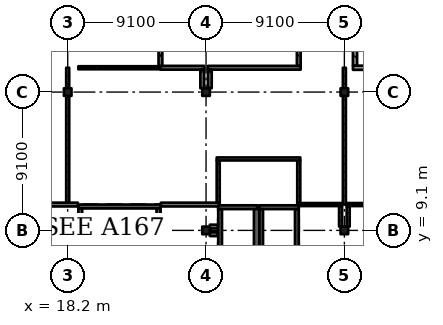
"""IFC4 building model, lengths in metres.
Left out: names, types, materials, properties, quantities, classifications, styles, units other than length and angle.
Written with IfcOpenShell. Run it as: python <this file> out.ifc"""

import sys

from ifc_helpers import new_model, si_unit, direction, frame, frame_2d, origin, origin_2d, place, context, subcontext, project, spatial, rectangle, extrude, element, fill, save


model = new_model("IFC4")
c1 = context("Model", 3, precision=1e-05, world=origin(), true_north=direction((0.0, 1.0)))
c2 = subcontext(c1, "Body", "Model", "MODEL_VIEW")
j1 = project(units=[si_unit("LENGTHUNIT", "METRE"), si_unit("PLANEANGLEUNIT", "RADIAN")], contexts=[c1])
p1 = place(None, origin())
s1 = spatial("IfcSite", under=j1, at=p1, CompositionType="ELEMENT")
p2 = place(p1, origin())
s2 = spatial("IfcBuilding", under=s1, at=p2, CompositionType="ELEMENT")
p3 = place(p2, frame((0.0, 0.0, 24.57)))
s3 = spatial("IfcBuildingStorey", under=s2, at=p3, CompositionType="ELEMENT", Elevation=24.57)
for number, where, z_axis, x_axis in (
    (1, (18.2, 9.1, 0.0), (0.0, 0.0, 1.0), (1.0, 0.0, 0.0)),
    (2, (18.2, 18.2, 0.0), (0.0, 0.0, 1.0), (1.0, 0.0, 0.0)),
    (3, (27.3, 9.1, 0.0), (0.0, 0.0, 1.0), (1.0, 0.0, 0.0)),
    (4, (27.3, 18.2, 0.0), (0.0, 0.0, 1.0), (1.0, 0.0, 0.0)),
    (5, (36.4, 9.1, 0.0), (0.0, 0.0, 1.0), (1.0, 0.0, 0.0)),
    (6, (36.4, 18.2, 0.0), (0.0, 0.0, 1.0), (1.0, 0.0, 0.0)),
):
    element("IfcColumn", number, at=place(p3, frame(where, z_axis=z_axis, x_axis=x_axis)), inside=s3, PredefinedType="COLUMN", context=c2, shape_type="SweptSolid", body=[
        extrude(rectangle(XDim=0.5, YDim=0.5, at=origin_2d()), origin(), (0.0, 0.0, 1.0), 4.55),
    ])
p4 = place(p3, frame((30.7, 10.625, 0.0), z_axis=(0.0, 0.0, 1.0), x_axis=(-1.0, 0.0, 0.0)))
e7 = element("IfcWall", 7, at=p4, inside=s3, PredefinedType="SHEAR", context=c2, shape_type="SweptSolid", body=[
    extrude(rectangle(XDim=2.6, YDim=0.25, at=frame_2d((1.3, 0.0))), origin(), (0.0, 0.0, 1.0), 4.55),
])
p5 = place(p4, frame((0.8, 0.0, 0.0)))
e8 = element("IfcOpeningElement", 8, at=p5, cuts=e7, PredefinedType="OPENING", context=c2, shape_type="SweptSolid", body=[
    extrude(rectangle(XDim=1.0, YDim=2.1, at=frame_2d((0.5, 1.05))), frame((0.0, 0.135, 0.0), z_axis=(0.0, -1.0, 0.0), x_axis=(1.0, 0.0, 0.0)), (0.0, 0.0, 1.0), 0.27),
])
p6 = place(p3, frame((28.225, 10.5, 0.0), z_axis=(0.0, 0.0, 1.0), x_axis=(0.0, -1.0, 0.0)))
e9 = element("IfcWall", 9, at=p6, inside=s3, PredefinedType="SHEAR", context=c2, shape_type="SweptSolid", body=[
    extrude(rectangle(XDim=2.9, YDim=0.25, at=frame_2d((1.45, 0.0))), origin(), (0.0, 0.0, 1.0), 4.55),
])
p7 = place(p3, frame((30.625, 10.5, 0.0), z_axis=(0.0, 0.0, 1.0), x_axis=(0.0, -1.0, 0.0)))
e10 = element("IfcWall", 10, at=p7, inside=s3, PredefinedType="SHEAR", context=c2, shape_type="SweptSolid", body=[
    extrude(rectangle(XDim=2.9, YDim=0.35, at=frame_2d((1.45, 0.0))), origin(), (0.0, 0.0, 1.0), 4.55),
])
p8 = place(p3, frame((33.4, 10.625, 0.0), z_axis=(0.0, 0.0, 1.0), x_axis=(-1.0, 0.0, 0.0)))
e11 = element("IfcWall", 11, at=p8, inside=s3, PredefinedType="SHEAR", context=c2, shape_type="SweptSolid", body=[
    extrude(rectangle(XDim=2.6, YDim=0.25, at=frame_2d((1.3, 0.0))), origin(), (0.0, 0.0, 1.0), 4.55),
])
p9 = place(p8, frame((0.8, 0.0, 0.0)))
e12 = element("IfcOpeningElement", 12, at=p9, cuts=e11, PredefinedType="OPENING", context=c2, shape_type="SweptSolid", body=[
    extrude(rectangle(XDim=1.0, YDim=2.1, at=frame_2d((0.5, 1.05))), frame((0.0, 0.135, 0.0), z_axis=(0.0, -1.0, 0.0), x_axis=(1.0, 0.0, 0.0)), (0.0, 0.0, 1.0), 0.27),
])
for number, where, z_axis, x_axis in (
    (13, (30.925, 10.5, 0.0), (0.0, 0.0, 1.0), (0.0, -1.0, 0.0)),
    (14, (33.275, 10.5, 0.0), (0.0, 0.0, 1.0), (0.0, -1.0, 0.0)),
):
    element("IfcWall", number, at=place(p3, frame(where, z_axis=z_axis, x_axis=x_axis)), inside=s3, PredefinedType="SHEAR", context=c2, shape_type="SweptSolid", body=[
        extrude(rectangle(XDim=2.9, YDim=0.25, at=frame_2d((1.45, 0.0))), origin(), (0.0, 0.0, 1.0), 4.55),
    ])
p10 = place(p3, frame((24.3, 10.675, 0.0), z_axis=(0.0, 0.0, 1.0), x_axis=(-1.0, 0.0, 0.0)))
e15 = element("IfcWall", 15, at=p10, inside=s3, PredefinedType="SHEAR", context=c2, shape_type="SweptSolid", body=[
    extrude(rectangle(XDim=5.4, YDim=0.25, at=frame_2d((2.7, 0.0))), origin(), (0.0, 0.0, 1.0), 4.55),
])
p11 = place(p10, frame((1.5, 0.0, 0.0)))
e16 = element("IfcOpeningElement", 16, at=p11, cuts=e15, PredefinedType="OPENING", context=c2, shape_type="SweptSolid", body=[
    extrude(rectangle(XDim=2.4, YDim=2.1, at=frame_2d((1.2, 1.05))), frame((0.0, 0.135, 0.0), z_axis=(0.0, -1.0, 0.0), x_axis=(1.0, 0.0, 0.0)), (0.0, 0.0, 1.0), 0.27),
])
for number, where, z_axis, x_axis in (
    (17, (19.025, 10.55, 0.0), (0.0, 0.0, 1.0), (0.0, -1.0, 0.0)),
    (18, (24.175, 10.55, 0.0), (0.0, 0.0, 1.0), (0.0, -1.0, 0.0)),
):
    element("IfcWall", number, at=place(p3, frame(where, z_axis=z_axis, x_axis=x_axis)), inside=s3, PredefinedType="SHEAR", context=c2, shape_type="SweptSolid", body=[
        extrude(rectangle(XDim=9.6, YDim=0.25, at=frame_2d((4.8, 0.0))), origin(), (0.0, 0.0, 1.0), 4.55),
    ])
p12 = place(p3, frame((15.23, 10.8, 0.0), z_axis=(0.0, 0.0, 1.0), x_axis=(1.0, 0.0, 0.0)))
e19 = element("IfcWall", 19, at=p12, inside=s3, PredefinedType="SOLIDWALL", context=c2, shape_type="SweptSolid", body=[
    extrude(rectangle(XDim=3.64, YDim=0.25, at=frame_2d((1.82, 0.0))), origin(), (0.0, 0.0, 1.0), 4.35),
])
p13 = place(p12, frame((1.12, 0.0, 0.0)))
e20 = element("IfcOpeningElement", 20, at=p13, cuts=e19, PredefinedType="OPENING", context=c2, shape_type="SweptSolid", body=[
    extrude(rectangle(XDim=0.8, YDim=2.1, at=frame_2d((0.4, 1.05))), frame((0.0, 0.135, 0.0), z_axis=(0.0, -1.0, 0.0), x_axis=(1.0, 0.0, 0.0)), (0.0, 0.0, 1.0), 0.27),
])
p14 = place(p3, frame((18.2, 17.95, 0.0), z_axis=(0.0, 0.0, 1.0), x_axis=(0.0, -1.0, 0.0)))
e21 = element("IfcWall", 21, at=p14, inside=s3, PredefinedType="PARTITIONING", context=c2, shape_type="SweptSolid", body=[
    extrude(rectangle(XDim=7.025, YDim=0.2, at=frame_2d((3.512, 0.0))), origin(), (0.0, 0.0, 1.0), 3.6),
])
p15 = place(p14, frame((0.85, 0.0, 0.0)))
e22 = element("IfcOpeningElement", 22, at=p15, cuts=e21, PredefinedType="OPENING", context=c2, shape_type="SweptSolid", body=[
    extrude(rectangle(XDim=1.8, YDim=2.4, at=frame_2d((0.9, 1.2))), frame((0.0, 0.11, 0.0), z_axis=(0.0, -1.0, 0.0), x_axis=(1.0, 0.0, 0.0)), (0.0, 0.0, 1.0), 0.22),
])
p16 = place(p14, frame((4.35, 0.0, 0.0)))
e23 = element("IfcOpeningElement", 23, at=p16, cuts=e21, PredefinedType="OPENING", context=c2, shape_type="SweptSolid", body=[
    extrude(rectangle(XDim=1.8, YDim=2.4, at=frame_2d((0.9, 1.2))), frame((0.0, 0.11, 0.0), z_axis=(0.0, -1.0, 0.0), x_axis=(1.0, 0.0, 0.0)), (0.0, 0.0, 1.0), 0.22),
])
p17 = place(p3, frame((18.2, 19.8, 0.0), z_axis=(0.0, 0.0, 1.0), x_axis=(0.0, -1.0, 0.0)))
e24 = element("IfcWall", 24, at=p17, inside=s3, PredefinedType="PARTITIONING", context=c2, shape_type="SweptSolid", body=[
    extrude(rectangle(XDim=1.35, YDim=0.2, at=frame_2d((0.675, 0.0))), origin(), (0.0, 0.0, 1.0), 3.6),
])
for number, where, z_axis, x_axis in (
    (25, (18.45, 8.85, 0.0), (0.0, 0.0, 1.0), (1.0, 0.0, 0.0)),
    (26, (18.87, 9.35, 0.0), (0.0, 0.0, 1.0), (-1.0, 0.0, 0.0)),
):
    element("IfcWall", number, at=place(p3, frame(where, z_axis=z_axis, x_axis=x_axis)), inside=s3, PredefinedType="SOLIDWALL", context=c2, shape_type="SweptSolid", body=[
        extrude(rectangle(XDim=0.42, YDim=0.25, at=frame_2d((0.21, 0.0))), origin(), (0.0, 0.0, 1.0), 4.35),
    ])
p18 = place(p3, frame((18.9, 19.8, 0.0), z_axis=(0.0, 0.0, 1.0), x_axis=(1.0, 0.0, 0.0)))
e27 = element("IfcWall", 27, at=p18, inside=s3, PredefinedType="PARTITIONING", context=c2, shape_type="SweptSolid", body=[
    extrude(rectangle(XDim=5.4, YDim=0.2, at=frame_2d((2.7, 0.0))), origin(), (0.0, 0.0, 1.0), 4.35),
])
p19 = place(p18, frame((1.85, 0.0, 0.0)))
e28 = element("IfcOpeningElement", 28, at=p19, cuts=e27, PredefinedType="OPENING", context=c2, shape_type="SweptSolid", body=[
    extrude(rectangle(XDim=1.8, YDim=2.4, at=frame_2d((0.9, 1.2))), frame((0.0, 0.11, 0.0), z_axis=(0.0, -1.0, 0.0), x_axis=(1.0, 0.0, 0.0)), (0.0, 0.0, 1.0), 0.22),
])
p20 = place(p3, frame((24.3, 19.8, 0.0), z_axis=(0.0, 0.0, 1.0), x_axis=(1.0, 0.0, 0.0)))
e29 = element("IfcWall", 29, at=p20, inside=s3, PredefinedType="SOLIDWALL", context=c2, shape_type="SweptSolid", body=[
    extrude(rectangle(XDim=2.875, YDim=0.25, at=frame_2d((1.438, 0.0))), origin(), (0.0, 0.0, 1.0), 4.35),
])
p21 = place(p3, frame((24.3, 19.925, 0.0), z_axis=(0.0, 0.0, 1.0), x_axis=(0.0, 1.0, 0.0)))
e30 = element("IfcWall", 30, at=p21, inside=s3, PredefinedType="SOLIDWALL", context=c2, shape_type="SweptSolid", body=[
    extrude(rectangle(XDim=6.945, YDim=0.25, at=frame_2d((3.473, 0.0))), origin(), (0.0, 0.0, 1.0), 4.35),
])
p22 = place(p3, frame((27.05, 19.675, 0.0), z_axis=(0.0, 0.0, 1.0), x_axis=(0.0, -1.0, 0.0)))
e31 = element("IfcWall", 31, at=p22, inside=s3, PredefinedType="SOLIDWALL", context=c2, shape_type="SweptSolid", body=[
    extrude(rectangle(XDim=1.225, YDim=0.25, at=frame_2d((0.613, 0.0))), origin(), (0.0, 0.0, 1.0), 4.35),
])
p23 = place(p3, frame((27.425, 19.8, 0.0), z_axis=(0.0, 0.0, 1.0), x_axis=(1.0, 0.0, 0.0)))
e32 = element("IfcWall", 32, at=p23, inside=s3, PredefinedType="SOLIDWALL", context=c2, shape_type="SweptSolid", body=[
    extrude(rectangle(XDim=6.1, YDim=0.25, at=frame_2d((3.05, 0.0))), origin(), (0.0, 0.0, 1.0), 4.35),
])
p24 = place(p23, frame((2.65, 0.0, 0.0)))
e33 = element("IfcOpeningElement", 33, at=p24, cuts=e32, PredefinedType="OPENING", context=c2, shape_type="SweptSolid", body=[
    extrude(rectangle(XDim=0.8, YDim=2.1, at=frame_2d((0.4, 1.05))), frame((0.0, 0.135, 0.0), z_axis=(0.0, -1.0, 0.0), x_axis=(1.0, 0.0, 0.0)), (0.0, 0.0, 1.0), 0.27),
])
p25 = place(p3, frame((27.55, 8.85, 0.0), z_axis=(0.0, 0.0, 1.0), x_axis=(1.0, 0.0, 0.0)))
e34 = element("IfcWall", 34, at=p25, inside=s3, PredefinedType="SOLIDWALL", context=c2, shape_type="SweptSolid", body=[
    extrude(rectangle(XDim=0.52, YDim=0.25, at=frame_2d((0.26, 0.0))), origin(), (0.0, 0.0, 1.0), 4.35),
])
p26 = place(p3, frame((27.55, 18.45, 0.0), z_axis=(0.0, 0.0, 1.0), x_axis=(0.0, 1.0, 0.0)))
e35 = element("IfcWall", 35, at=p26, inside=s3, PredefinedType="SOLIDWALL", context=c2, shape_type="SweptSolid", body=[
    extrude(rectangle(XDim=1.225, YDim=0.25, at=frame_2d((0.613, 0.0))), origin(), (0.0, 0.0, 1.0), 4.35),
])
p27 = place(p3, frame((28.07, 9.35, 0.0), z_axis=(0.0, 0.0, 1.0), x_axis=(-1.0, 0.0, 0.0)))
e36 = element("IfcWall", 36, at=p27, inside=s3, PredefinedType="SOLIDWALL", context=c2, shape_type="SweptSolid", body=[
    extrude(rectangle(XDim=0.52, YDim=0.25, at=frame_2d((0.26, 0.0))), origin(), (0.0, 0.0, 1.0), 4.35),
])
p28 = place(p3, frame((28.1, 13.7, 0.0), z_axis=(0.0, 0.0, 1.0), x_axis=(0.0, -1.0, 0.0)))
e37 = element("IfcWall", 37, at=p28, inside=s3, PredefinedType="PARTITIONING", context=c2, shape_type="SweptSolid", body=[
    extrude(rectangle(XDim=2.775, YDim=0.2, at=frame_2d((1.387, 0.0))), origin(), (0.0, 0.0, 1.0), 4.35),
])
p29 = place(p28, frame((0.45, 0.0, 0.0)))
e38 = element("IfcOpeningElement", 38, at=p29, cuts=e37, PredefinedType="OPENING", context=c2, shape_type="SweptSolid", body=[
    extrude(rectangle(XDim=1.8, YDim=2.4, at=frame_2d((0.9, 1.2))), frame((0.0, 0.11, 0.0), z_axis=(0.0, -1.0, 0.0), x_axis=(1.0, 0.0, 0.0)), (0.0, 0.0, 1.0), 0.22),
])
p30 = place(p3, frame((28.2, 10.8, 0.0), z_axis=(0.0, 0.0, 1.0), x_axis=(-1.0, 0.0, 0.0)))
e39 = element("IfcWall", 39, at=p30, inside=s3, PredefinedType="SOLIDWALL", context=c2, shape_type="SweptSolid", body=[
    extrude(rectangle(XDim=3.87, YDim=0.25, at=frame_2d((1.935, 0.0))), origin(), (0.0, 0.0, 1.0), 4.35),
])
p31 = place(p30, frame((1.45, 0.0, 0.0)))
e40 = element("IfcOpeningElement", 40, at=p31, cuts=e39, PredefinedType="OPENING", context=c2, shape_type="SweptSolid", body=[
    extrude(rectangle(XDim=1.0, YDim=2.1, at=frame_2d((0.5, 1.05))), frame((0.0, 0.135, 0.0), z_axis=(0.0, -1.0, 0.0), x_axis=(1.0, 0.0, 0.0)), (0.0, 0.0, 1.0), 0.27),
])
p32 = place(p3, frame((33.4, 10.9, 0.0), z_axis=(0.0, 0.0, 1.0), x_axis=(0.0, 1.0, 0.0)))
e41 = element("IfcWall", 41, at=p32, inside=s3, PredefinedType="PARTITIONING", context=c2, shape_type="SweptSolid", body=[
    extrude(rectangle(XDim=2.8, YDim=0.2, at=frame_2d((1.4, 0.0))), origin(), (0.0, 0.0, 1.0), 4.35),
])
p33 = place(p32, frame((0.55, 0.0, 0.0)))
e42 = element("IfcOpeningElement", 42, at=p33, cuts=e41, PredefinedType="OPENING", context=c2, shape_type="SweptSolid", body=[
    extrude(rectangle(XDim=1.8, YDim=2.4, at=frame_2d((0.9, 1.2))), frame((0.0, 0.11, 0.0), z_axis=(0.0, -1.0, 0.0), x_axis=(1.0, 0.0, 0.0)), (0.0, 0.0, 1.0), 0.22),
])
p34 = place(p3, frame((33.4, 29.775, 0.0), z_axis=(0.0, 0.0, 1.0), x_axis=(0.0, -1.0, 0.0)))
e43 = element("IfcWall", 43, at=p34, inside=s3, PredefinedType="SOLIDWALL", context=c2, shape_type="SweptSolid", body=[
    extrude(rectangle(XDim=9.85, YDim=0.25, at=frame_2d((4.925, 0.0))), origin(), (0.0, 0.0, 1.0), 4.35),
])
p35 = place(p3, frame((33.5, 13.8, 0.0), z_axis=(0.0, 0.0, 1.0), x_axis=(-1.0, 0.0, 0.0)))
e44 = element("IfcWall", 44, at=p35, inside=s3, PredefinedType="PARTITIONING", context=c2, shape_type="SweptSolid", body=[
    extrude(rectangle(XDim=5.5, YDim=0.2, at=frame_2d((2.75, 0.0))), origin(), (0.0, 0.0, 1.0), 4.35),
])
p36 = place(p35, frame((1.85, 0.0, 0.0)))
e45 = element("IfcOpeningElement", 45, at=p36, cuts=e44, PredefinedType="OPENING", context=c2, shape_type="SweptSolid", body=[
    extrude(rectangle(XDim=1.8, YDim=2.4, at=frame_2d((0.9, 1.2))), frame((0.0, 0.11, 0.0), z_axis=(0.0, -1.0, 0.0), x_axis=(1.0, 0.0, 0.0)), (0.0, 0.0, 1.0), 0.22),
])
p37 = place(p3, frame((36.15, 9.35, 0.0), z_axis=(0.0, 0.0, 1.0), x_axis=(0.0, 1.0, 0.0)))
e46 = element("IfcWall", 46, at=p37, inside=s3, PredefinedType="PARTITIONING", context=c2, shape_type="SweptSolid", body=[
    extrude(rectangle(XDim=1.35, YDim=0.2, at=frame_2d((0.675, 0.0))), origin(), (0.0, 0.0, 1.0), 3.6),
])
p38 = place(p3, frame((36.25, 10.8, 0.0), z_axis=(0.0, 0.0, 1.0), x_axis=(-1.0, 0.0, 0.0)))
e47 = element("IfcWall", 47, at=p38, inside=s3, PredefinedType="PARTITIONING", context=c2, shape_type="SweptSolid", body=[
    extrude(rectangle(XDim=2.95, YDim=0.2, at=frame_2d((1.475, 0.0))), origin(), (0.0, 0.0, 1.0), 4.35),
])
p39 = place(p38, frame((0.55, 0.0, 0.0)))
e48 = element("IfcOpeningElement", 48, at=p39, cuts=e47, PredefinedType="OPENING", context=c2, shape_type="SweptSolid", body=[
    extrude(rectangle(XDim=1.8, YDim=2.4, at=frame_2d((0.9, 1.2))), frame((0.0, 0.11, 0.0), z_axis=(0.0, -1.0, 0.0), x_axis=(1.0, 0.0, 0.0)), (0.0, 0.0, 1.0), 0.22),
])
p40 = place(p3, frame((36.4, 17.95, 0.0), z_axis=(0.0, 0.0, 1.0), x_axis=(0.0, -1.0, 0.0)))
e49 = element("IfcWall", 49, at=p40, inside=s3, PredefinedType="PARTITIONING", context=c2, shape_type="SweptSolid", body=[
    extrude(rectangle(XDim=7.15, YDim=0.2, at=frame_2d((3.575, 0.0))), origin(), (0.0, 0.0, 1.0), 3.6),
])
p41 = place(p40, frame((0.85, 0.0, 0.0)))
e50 = element("IfcOpeningElement", 50, at=p41, cuts=e49, PredefinedType="OPENING", context=c2, shape_type="SweptSolid", body=[
    extrude(rectangle(XDim=1.8, YDim=2.4, at=frame_2d((0.9, 1.2))), frame((0.0, 0.11, 0.0), z_axis=(0.0, -1.0, 0.0), x_axis=(1.0, 0.0, 0.0)), (0.0, 0.0, 1.0), 0.22),
])
p42 = place(p40, frame((4.45, 0.0, 0.0)))
e51 = element("IfcOpeningElement", 51, at=p42, cuts=e49, PredefinedType="OPENING", context=c2, shape_type="SweptSolid", body=[
    extrude(rectangle(XDim=1.8, YDim=2.4, at=frame_2d((0.9, 1.2))), frame((0.0, 0.11, 0.0), z_axis=(0.0, -1.0, 0.0), x_axis=(1.0, 0.0, 0.0)), (0.0, 0.0, 1.0), 0.22),
])
p43 = place(p3, frame((36.4, 19.8, 0.0), z_axis=(0.0, 0.0, 1.0), x_axis=(0.0, -1.0, 0.0)))
e52 = element("IfcWall", 52, at=p43, inside=s3, PredefinedType="PARTITIONING", context=c2, shape_type="SweptSolid", body=[
    extrude(rectangle(XDim=1.35, YDim=0.2, at=frame_2d((0.675, 0.0))), origin(), (0.0, 0.0, 1.0), 3.6),
])
p44 = place(p3, frame((36.65, 10.7, 0.0), z_axis=(0.0, 0.0, 1.0), x_axis=(0.0, -1.0, 0.0)))
e53 = element("IfcWall", 53, at=p44, inside=s3, PredefinedType="PARTITIONING", context=c2, shape_type="SweptSolid", body=[
    extrude(rectangle(XDim=1.35, YDim=0.2, at=frame_2d((0.675, 0.0))), origin(), (0.0, 0.0, 1.0), 3.6),
])
p45 = place(p3, frame((36.962, 19.8, 0.0), z_axis=(0.0, 0.0, 1.0), x_axis=(1.0, 0.0, 0.0)))
e54 = element("IfcWall", 54, at=p45, inside=s3, PredefinedType="SOLIDWALL", context=c2, shape_type="SweptSolid", body=[
    extrude(rectangle(XDim=3.738, YDim=0.275, at=frame_2d((1.869, 0.0))), origin(), (0.0, 0.0, 1.0), 4.35),
])
p46 = place(p45, frame((1.25, 0.0, 0.0)))
e55 = element("IfcOpeningElement", 55, at=p46, cuts=e54, PredefinedType="OPENING", context=c2, shape_type="SweptSolid", body=[
    extrude(rectangle(XDim=1.2, YDim=2.4, at=frame_2d((0.6, 1.2))), frame((0.0, 0.147, 0.0), z_axis=(0.0, -1.0, 0.0), x_axis=(1.0, 0.0, 0.0)), (0.0, 0.0, 1.0), 0.295),
])
p47 = place(p3, frame((37.1, 26.913, 0.0), z_axis=(0.0, 0.0, 1.0), x_axis=(0.0, -1.0, 0.0)))
e56 = element("IfcWall", 56, at=p47, inside=s3, PredefinedType="SOLIDWALL", context=c2, shape_type="SweptSolid", body=[
    extrude(rectangle(XDim=6.975, YDim=0.275, at=frame_2d((3.488, 0.0))), origin(), (0.0, 0.0, 1.0), 4.35),
])
p48 = place(p3, frame((40.7, 10.8, 0.0), z_axis=(0.0, 0.0, 1.0), x_axis=(-1.0, 0.0, 0.0)))
e57 = element("IfcWall", 57, at=p48, inside=s3, PredefinedType="PARTITIONING", context=c2, shape_type="SweptSolid", body=[
    extrude(rectangle(XDim=4.15, YDim=0.2, at=frame_2d((2.075, 0.0))), origin(), (0.0, 0.0, 1.0), 4.35),
])
p49 = place(p48, frame((1.15, 0.0, 0.0)))
e58 = element("IfcOpeningElement", 58, at=p49, cuts=e57, PredefinedType="OPENING", context=c2, shape_type="SweptSolid", body=[
    extrude(rectangle(XDim=1.8, YDim=2.4, at=frame_2d((0.9, 1.2))), frame((0.0, 0.11, 0.0), z_axis=(0.0, -1.0, 0.0), x_axis=(1.0, 0.0, 0.0)), (0.0, 0.0, 1.0), 0.22),
])
p50 = place(p24, origin())
e59 = element("IfcDoor", 59, at=p50, inside=s3, OperationType="SINGLE_SWING_LEFT", PredefinedType="DOOR", context=c2, shape_type="SweptSolid", body=[
    extrude(rectangle(XDim=0.8, YDim=2.1, at=frame_2d((0.4, 1.05))), frame((0.0, 0.025, 0.0), z_axis=(0.0, -1.0, 0.0), x_axis=(1.0, 0.0, 0.0)), (0.0, 0.0, 1.0), 0.05),
])
fill(e33, e59)
p51 = place(p31, origin())
e60 = element("IfcDoor", 60, at=p51, inside=s3, OperationType="SINGLE_SWING_LEFT", PredefinedType="DOOR", context=c2, shape_type="SweptSolid", body=[
    extrude(rectangle(XDim=1.0, YDim=2.1, at=frame_2d((0.5, 1.05))), frame((0.0, 0.025, 0.0), z_axis=(0.0, -1.0, 0.0), x_axis=(1.0, 0.0, 0.0)), (0.0, 0.0, 1.0), 0.05),
])
fill(e40, e60)
p52 = place(p15, origin())
e61 = element("IfcDoor", 61, at=p52, inside=s3, OperationType="DOUBLE_DOOR_SINGLE_SWING", PredefinedType="DOOR", context=c2, shape_type="SweptSolid", body=[
    extrude(rectangle(XDim=1.8, YDim=2.4, at=frame_2d((0.9, 1.2))), frame((0.0, 0.025, 0.0), z_axis=(0.0, -1.0, 0.0), x_axis=(1.0, 0.0, 0.0)), (0.0, 0.0, 1.0), 0.05),
])
fill(e22, e61)
p53 = place(p16, origin())
e62 = element("IfcDoor", 62, at=p53, inside=s3, OperationType="DOUBLE_DOOR_SINGLE_SWING", PredefinedType="DOOR", context=c2, shape_type="SweptSolid", body=[
    extrude(rectangle(XDim=1.8, YDim=2.4, at=frame_2d((0.9, 1.2))), frame((0.0, 0.025, 0.0), z_axis=(0.0, -1.0, 0.0), x_axis=(1.0, 0.0, 0.0)), (0.0, 0.0, 1.0), 0.05),
])
fill(e23, e62)
p54 = place(p41, origin())
e63 = element("IfcDoor", 63, at=p54, inside=s3, OperationType="DOUBLE_DOOR_SINGLE_SWING", PredefinedType="DOOR", context=c2, shape_type="SweptSolid", body=[
    extrude(rectangle(XDim=1.8, YDim=2.4, at=frame_2d((0.9, 1.2))), frame((0.0, 0.025, 0.0), z_axis=(0.0, -1.0, 0.0), x_axis=(1.0, 0.0, 0.0)), (0.0, 0.0, 1.0), 0.05),
])
fill(e50, e63)
p55 = place(p42, origin())
e64 = element("IfcDoor", 64, at=p55, inside=s3, OperationType="DOUBLE_DOOR_SINGLE_SWING", PredefinedType="DOOR", context=c2, shape_type="SweptSolid", body=[
    extrude(rectangle(XDim=1.8, YDim=2.4, at=frame_2d((0.9, 1.2))), frame((0.0, 0.025, 0.0), z_axis=(0.0, -1.0, 0.0), x_axis=(1.0, 0.0, 0.0)), (0.0, 0.0, 1.0), 0.05),
])
fill(e51, e64)
p56 = place(p36, origin())
e65 = element("IfcDoor", 65, at=p56, inside=s3, OperationType="DOUBLE_DOOR_SINGLE_SWING", PredefinedType="DOOR", context=c2, shape_type="SweptSolid", body=[
    extrude(rectangle(XDim=1.8, YDim=2.4, at=frame_2d((0.9, 1.2))), frame((0.0, 0.025, 0.0), z_axis=(0.0, -1.0, 0.0), x_axis=(1.0, 0.0, 0.0)), (0.0, 0.0, 1.0), 0.05),
])
fill(e45, e65)
p57 = place(p33, origin())
e66 = element("IfcDoor", 66, at=p57, inside=s3, OperationType="DOUBLE_DOOR_SINGLE_SWING", PredefinedType="DOOR", context=c2, shape_type="SweptSolid", body=[
    extrude(rectangle(XDim=1.8, YDim=2.4, at=frame_2d((0.9, 1.2))), frame((0.0, 0.025, 0.0), z_axis=(0.0, -1.0, 0.0), x_axis=(1.0, 0.0, 0.0)), (0.0, 0.0, 1.0), 0.05),
])
fill(e42, e66)
p58 = place(p29, origin())
e67 = element("IfcDoor", 67, at=p58, inside=s3, OperationType="DOUBLE_DOOR_SINGLE_SWING", PredefinedType="DOOR", context=c2, shape_type="SweptSolid", body=[
    extrude(rectangle(XDim=1.8, YDim=2.4, at=frame_2d((0.9, 1.2))), frame((0.0, 0.025, 0.0), z_axis=(0.0, -1.0, 0.0), x_axis=(1.0, 0.0, 0.0)), (0.0, 0.0, 1.0), 0.05),
])
fill(e38, e67)
p59 = place(p19, origin())
e68 = element("IfcDoor", 68, at=p59, inside=s3, OperationType="DOUBLE_DOOR_SINGLE_SWING", PredefinedType="DOOR", context=c2, shape_type="SweptSolid", body=[
    extrude(rectangle(XDim=1.8, YDim=2.4, at=frame_2d((0.9, 1.2))), frame((0.0, 0.025, 0.0), z_axis=(0.0, -1.0, 0.0), x_axis=(1.0, 0.0, 0.0)), (0.0, 0.0, 1.0), 0.05),
])
fill(e28, e68)
p60 = place(p39, origin())
e69 = element("IfcDoor", 69, at=p60, inside=s3, OperationType="DOUBLE_DOOR_SINGLE_SWING", PredefinedType="DOOR", context=c2, shape_type="SweptSolid", body=[
    extrude(rectangle(XDim=1.8, YDim=2.4, at=frame_2d((0.9, 1.2))), frame((0.0, 0.025, 0.0), z_axis=(0.0, -1.0, 0.0), x_axis=(1.0, 0.0, 0.0)), (0.0, 0.0, 1.0), 0.05),
])
fill(e48, e69)
p61 = place(p11, origin())
e70 = element("IfcDoor", 70, at=p61, inside=s3, OperationType="DOUBLE_DOOR_SINGLE_SWING", PredefinedType="DOOR", context=c2, shape_type="SweptSolid", body=[
    extrude(rectangle(XDim=2.4, YDim=2.1, at=frame_2d((1.2, 1.05))), frame((0.0, 0.025, 0.0), z_axis=(0.0, -1.0, 0.0), x_axis=(1.0, 0.0, 0.0)), (0.0, 0.0, 1.0), 0.05),
])
fill(e16, e70)
p62 = place(p5, origin())
e71 = element("IfcDoor", 71, at=p62, inside=s3, OperationType="DOUBLE_DOOR_SLIDING", PredefinedType="DOOR", context=c2, shape_type="SweptSolid", body=[
    extrude(rectangle(XDim=1.0, YDim=2.1, at=frame_2d((0.5, 1.05))), frame((0.0, 0.025, 0.0), z_axis=(0.0, -1.0, 0.0), x_axis=(1.0, 0.0, 0.0)), (0.0, 0.0, 1.0), 0.05),
])
fill(e8, e71)
p63 = place(p9, origin())
e72 = element("IfcDoor", 72, at=p63, inside=s3, OperationType="DOUBLE_DOOR_SLIDING", PredefinedType="DOOR", context=c2, shape_type="SweptSolid", body=[
    extrude(rectangle(XDim=1.0, YDim=2.1, at=frame_2d((0.5, 1.05))), frame((0.0, 0.025, 0.0), z_axis=(0.0, -1.0, 0.0), x_axis=(1.0, 0.0, 0.0)), (0.0, 0.0, 1.0), 0.05),
])
fill(e12, e72)
save(model, sys.argv[1])
